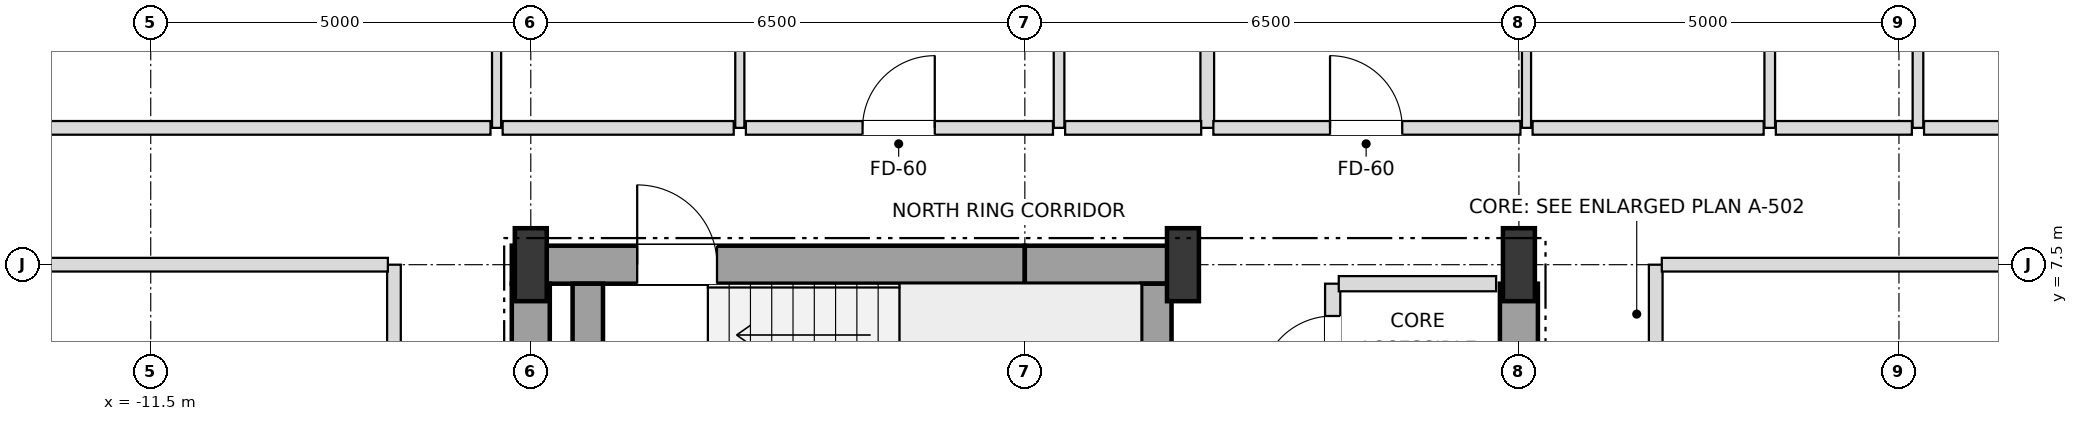
"""IFC4 building model, lengths in metres.
Left out: names, types, materials, properties, quantities, classifications, styles, units other than length and angle.
Written with IfcOpenShell. Run it as: python <this file> out.ifc"""

import sys

from ifc_helpers import new_model, si_unit, direction, frame, frame_2d, origin, origin_2d, place, context, subcontext, project, spatial, rectangle, i_section, extrude, element, fill, save


model = new_model("IFC4")
c1 = context("Model", 3, precision=1e-05, world=origin(), true_north=direction((0.0, 1.0)))
c2 = subcontext(c1, "Body", "Model", "MODEL_VIEW")
j1 = project(units=[si_unit("LENGTHUNIT", "METRE"), si_unit("PLANEANGLEUNIT", "RADIAN")], contexts=[c1])
p1 = place(None, origin())
s1 = spatial("IfcSite", under=j1, at=p1, CompositionType="ELEMENT")
p2 = place(p1, origin())
s2 = spatial("IfcBuilding", under=s1, at=p2, CompositionType="ELEMENT")
p3 = place(p2, frame((0.0, 0.0, 57.6)))
s3 = spatial("IfcBuildingStorey", under=s2, at=p3, CompositionType="ELEMENT", Elevation=57.6)
for number, where, z_axis, x_axis in (
    (1, (-6.5, 7.5, 0.0), (0.0, 0.0, 1.0), (1.0, 0.0, 0.0)),
    (2, (2.08, 7.5, 0.0), (0.0, 0.0, 1.0), (1.0, 0.0, 0.0)),
    (3, (6.5, 7.5, 0.0), (0.0, 0.0, 1.0), (1.0, 0.0, 0.0)),
):
    element("IfcColumn", number, at=place(p3, frame(where, z_axis=z_axis, x_axis=x_axis)), inside=s3, PredefinedType="COLUMN", context=c2, shape_type="SweptSolid", body=[
        extrude(i_section(OverallWidth=0.42, OverallDepth=0.96, WebThickness=0.022, FlangeThickness=0.034, at=origin_2d()), origin(), (0.0, 0.0, 1.0), 3.6),
    ])
p4 = place(p3, frame((-6.75, 7.5, 0.0), z_axis=(0.0, 0.0, 1.0), x_axis=(1.0, 0.0, 0.0)))
e4 = element("IfcWall", 4, at=p4, inside=s3, PredefinedType="SHEAR", context=c2, shape_type="SweptSolid", body=[
    extrude(rectangle(XDim=6.75, YDim=0.5, at=frame_2d((3.375, 0.0))), origin(), (0.0, 0.0, 1.0), 3.38),
])
p5 = place(p4, frame((1.65, 0.0, 0.0)))
e5 = element("IfcOpeningElement", 5, at=p5, cuts=e4, PredefinedType="OPENING", context=c2, shape_type="SweptSolid", body=[
    extrude(rectangle(XDim=1.05, YDim=2.15, at=frame_2d((0.525, 1.075))), frame((0.0, 0.26, 0.0), z_axis=(0.0, -1.0, 0.0), x_axis=(1.0, 0.0, 0.0)), (0.0, 0.0, 1.0), 0.52),
])
p6 = place(p3, frame((0.0, 7.5, 0.0), z_axis=(0.0, 0.0, 1.0), x_axis=(1.0, 0.0, 0.0)))
e6 = element("IfcWall", 6, at=p6, inside=s3, PredefinedType="SHEAR", context=c2, shape_type="SweptSolid", body=[
    extrude(rectangle(XDim=2.08, YDim=0.5, at=frame_2d((1.04, 0.0))), origin(), (0.0, 0.0, 1.0), 3.38),
])
for number, where, z_axis, x_axis in (
    (7, (-6.5, 3.95, 0.0), (0.0, 0.0, 1.0), (0.0, 1.0, 0.0)),
    (8, (6.5, 3.95, 0.0), (0.0, 0.0, 1.0), (0.0, 1.0, 0.0)),
):
    element("IfcWall", number, at=place(p3, frame(where, z_axis=z_axis, x_axis=x_axis)), inside=s3, PredefinedType="SHEAR", context=c2, shape_type="SweptSolid", body=[
        extrude(rectangle(XDim=3.3, YDim=0.5, at=frame_2d((1.65, 0.0))), origin(), (0.0, 0.0, 1.0), 3.38),
    ])
for number, where, z_axis, x_axis in (
    (9, (1.73, 3.95, 0.0), (0.0, 0.0, 1.0), (0.0, 1.0, 0.0)),
    (10, (-5.75, 3.95, 0.0), (0.0, 0.0, 1.0), (0.0, 1.0, 0.0)),
):
    element("IfcWall", number, at=place(p3, frame(where, z_axis=z_axis, x_axis=x_axis)), inside=s3, PredefinedType="SHEAR", context=c2, shape_type="SweptSolid", body=[
        extrude(rectangle(XDim=3.3, YDim=0.4, at=frame_2d((1.65, 0.0))), origin(), (0.0, 0.0, 1.0), 3.38),
    ])
p7 = place(p3, frame((-8.3, -7.5, 0.0), z_axis=(0.0, 0.0, 1.0), x_axis=(0.0, 1.0, 0.0)))
e11 = element("IfcWall", 11, at=p7, inside=s3, PredefinedType="PARTITIONING", context=c2, shape_type="SweptSolid", body=[
    extrude(rectangle(XDim=15.0, YDim=0.18, at=frame_2d((7.5, 0.0))), origin(), (0.0, 0.0, 1.0), 3.38),
])
p8 = place(p7, frame((3.475, 0.0, 0.0)))
e12 = element("IfcOpeningElement", 12, at=p8, cuts=e11, PredefinedType="OPENING", context=c2, shape_type="SweptSolid", body=[
    extrude(rectangle(XDim=0.95, YDim=2.15, at=frame_2d((0.475, 1.075))), frame((0.0, 0.1, 0.0), z_axis=(0.0, -1.0, 0.0), x_axis=(1.0, 0.0, 0.0)), (0.0, 0.0, 1.0), 0.2),
])
p9 = place(p3, frame((-6.95, 9.3, 0.0), z_axis=(0.0, 0.0, 1.0), x_axis=(0.0, 1.0, 0.0)))
e13 = element("IfcWall", 13, at=p9, inside=s3, PredefinedType="PARTITIONING", context=c2, shape_type="SweptSolid", body=[
    extrude(rectangle(XDim=9.6, YDim=0.12, at=frame_2d((4.8, 0.0))), origin(), (0.0, 0.0, 1.0), 2.816),
])
p10 = place(p9, frame((4.35, 0.0, 0.0)))
e14 = element("IfcOpeningElement", 14, at=p10, cuts=e13, PredefinedType="OPENING", context=c2, shape_type="SweptSolid", body=[
    extrude(rectangle(XDim=0.9, YDim=2.1, at=frame_2d((0.45, 1.05))), frame((0.0, 0.07, 0.0), z_axis=(0.0, -1.0, 0.0), x_axis=(1.0, 0.0, 0.0)), (0.0, 0.0, 1.0), 0.14),
])
p11 = place(p3, frame((-3.75, 9.3, 0.0), z_axis=(0.0, 0.0, 1.0), x_axis=(0.0, 1.0, 0.0)))
e15 = element("IfcWall", 15, at=p11, inside=s3, PredefinedType="PARTITIONING", context=c2, shape_type="SweptSolid", body=[
    extrude(rectangle(XDim=15.6, YDim=0.12, at=frame_2d((7.8, 0.0))), origin(), (0.0, 0.0, 1.0), 2.816),
])
p12 = place(p11, frame((4.325, 0.0, 0.0)))
e16 = element("IfcOpeningElement", 16, at=p12, cuts=e15, PredefinedType="OPENING", context=c2, shape_type="SweptSolid", body=[
    extrude(rectangle(XDim=0.95, YDim=2.1, at=frame_2d((0.475, 1.05))), frame((0.0, 0.07, 0.0), z_axis=(0.0, -1.0, 0.0), x_axis=(1.0, 0.0, 0.0)), (0.0, 0.0, 1.0), 0.14),
])
p13 = place(p11, frame((12.15, 0.0, 0.0)))
e17 = element("IfcOpeningElement", 17, at=p13, cuts=e15, PredefinedType="OPENING", context=c2, shape_type="SweptSolid", body=[
    extrude(rectangle(XDim=0.9, YDim=2.1, at=frame_2d((0.45, 1.05))), frame((0.0, 0.07, 0.0), z_axis=(0.0, -1.0, 0.0), x_axis=(1.0, 0.0, 0.0)), (0.0, 0.0, 1.0), 0.14),
])
p14 = place(p3, frame((0.45, 9.3, 0.0), z_axis=(0.0, 0.0, 1.0), x_axis=(0.0, 1.0, 0.0)))
e18 = element("IfcWall", 18, at=p14, inside=s3, PredefinedType="PARTITIONING", context=c2, shape_type="SweptSolid", body=[
    extrude(rectangle(XDim=9.6, YDim=0.14, at=frame_2d((4.8, 0.0))), origin(), (0.0, 0.0, 1.0), 2.948),
])
p15 = place(p14, frame((4.35, 0.0, 0.0)))
e19 = element("IfcOpeningElement", 19, at=p15, cuts=e18, PredefinedType="OPENING", context=c2, shape_type="SweptSolid", body=[
    extrude(rectangle(XDim=0.9, YDim=2.1, at=frame_2d((0.45, 1.05))), frame((0.0, 0.08, 0.0), z_axis=(0.0, -1.0, 0.0), x_axis=(1.0, 0.0, 0.0)), (0.0, 0.0, 1.0), 0.16),
])
p16 = place(p3, frame((2.4, 9.3, 0.0), z_axis=(0.0, 0.0, 1.0), x_axis=(0.0, 1.0, 0.0)))
e20 = element("IfcWall", 20, at=p16, inside=s3, PredefinedType="PARTITIONING", context=c2, shape_type="SweptSolid", body=[
    extrude(rectangle(XDim=15.6, YDim=0.18, at=frame_2d((7.8, 0.0))), origin(), (0.0, 0.0, 1.0), 2.816),
])
p17 = place(p3, frame((4.05, 5.55, 0.0), z_axis=(0.0, 0.0, 1.0), x_axis=(0.0, 1.0, 0.0)))
e21 = element("IfcWall", 21, at=p17, inside=s3, PredefinedType="SOLIDWALL", context=c2, shape_type="SweptSolid", body=[
    extrude(rectangle(XDim=1.7, YDim=0.2, at=frame_2d((0.85, 0.0))), origin(), (0.0, 0.0, 1.0), 3.38),
])
p18 = place(p17, frame((0.325, 0.0, 0.0)))
e22 = element("IfcOpeningElement", 22, at=p18, cuts=e21, PredefinedType="OPENING", context=c2, shape_type="SweptSolid", body=[
    extrude(rectangle(XDim=0.95, YDim=2.15, at=frame_2d((0.475, 1.075))), frame((0.0, 0.11, 0.0), z_axis=(0.0, -1.0, 0.0), x_axis=(1.0, 0.0, 0.0)), (0.0, 0.0, 1.0), 0.22),
])
p19 = place(p3, frame((6.6, 9.3, 0.0), z_axis=(0.0, 0.0, 1.0), x_axis=(0.0, 1.0, 0.0)))
e23 = element("IfcWall", 23, at=p19, inside=s3, PredefinedType="PARTITIONING", context=c2, shape_type="SweptSolid", body=[
    extrude(rectangle(XDim=9.6, YDim=0.12, at=frame_2d((4.8, 0.0))), origin(), (0.0, 0.0, 1.0), 2.816),
])
p20 = place(p19, frame((4.325, 0.0, 0.0)))
e24 = element("IfcOpeningElement", 24, at=p20, cuts=e23, PredefinedType="OPENING", context=c2, shape_type="SweptSolid", body=[
    extrude(rectangle(XDim=0.95, YDim=2.1, at=frame_2d((0.475, 1.05))), frame((0.0, 0.07, 0.0), z_axis=(0.0, -1.0, 0.0), x_axis=(1.0, 0.0, 0.0)), (0.0, 0.0, 1.0), 0.14),
])
p21 = place(p3, frame((8.3, -7.5, 0.0), z_axis=(0.0, 0.0, 1.0), x_axis=(0.0, 1.0, 0.0)))
e25 = element("IfcWall", 25, at=p21, inside=s3, PredefinedType="PARTITIONING", context=c2, shape_type="SweptSolid", body=[
    extrude(rectangle(XDim=15.0, YDim=0.18, at=frame_2d((7.5, 0.0))), origin(), (0.0, 0.0, 1.0), 3.38),
])
p22 = place(p21, frame((3.475, 0.0, 0.0)))
e26 = element("IfcOpeningElement", 26, at=p22, cuts=e25, PredefinedType="OPENING", context=c2, shape_type="SweptSolid", body=[
    extrude(rectangle(XDim=0.95, YDim=2.15, at=frame_2d((0.475, 1.075))), frame((0.0, 0.1, 0.0), z_axis=(0.0, -1.0, 0.0), x_axis=(1.0, 0.0, 0.0)), (0.0, 0.0, 1.0), 0.2),
])
p23 = place(p3, frame((9.8, 9.3, 0.0), z_axis=(0.0, 0.0, 1.0), x_axis=(0.0, 1.0, 0.0)))
e27 = element("IfcWall", 27, at=p23, inside=s3, PredefinedType="PARTITIONING", context=c2, shape_type="SweptSolid", body=[
    extrude(rectangle(XDim=9.6, YDim=0.14, at=frame_2d((4.8, 0.0))), origin(), (0.0, 0.0, 1.0), 2.816),
])
p24 = place(p23, frame((4.35, 0.0, 0.0)))
e28 = element("IfcOpeningElement", 28, at=p24, cuts=e27, PredefinedType="OPENING", context=c2, shape_type="SweptSolid", body=[
    extrude(rectangle(XDim=0.9, YDim=2.1, at=frame_2d((0.45, 1.05))), frame((0.0, 0.08, 0.0), z_axis=(0.0, -1.0, 0.0), x_axis=(1.0, 0.0, 0.0)), (0.0, 0.0, 1.0), 0.16),
])
p25 = place(p3, frame((11.75, 9.3, 0.0), z_axis=(0.0, 0.0, 1.0), x_axis=(0.0, 1.0, 0.0)))
e29 = element("IfcWall", 29, at=p25, inside=s3, PredefinedType="PARTITIONING", context=c2, shape_type="SweptSolid", body=[
    extrude(rectangle(XDim=15.6, YDim=0.14, at=frame_2d((7.8, 0.0))), origin(), (0.0, 0.0, 1.0), 2.736),
])
p26 = place(p25, frame((12.15, 0.0, 0.0)))
e30 = element("IfcOpeningElement", 30, at=p26, cuts=e29, PredefinedType="OPENING", context=c2, shape_type="SweptSolid", body=[
    extrude(rectangle(XDim=0.9, YDim=2.1, at=frame_2d((0.45, 1.05))), frame((0.0, 0.08, 0.0), z_axis=(0.0, -1.0, 0.0), x_axis=(1.0, 0.0, 0.0)), (0.0, 0.0, 1.0), 0.16),
])
p27 = place(p3, frame((4.13, 7.25, 0.0), z_axis=(0.0, 0.0, 1.0), x_axis=(1.0, 0.0, 0.0)))
e31 = element("IfcWall", 31, at=p27, inside=s3, PredefinedType="SOLIDWALL", context=c2, shape_type="SweptSolid", body=[
    extrude(rectangle(XDim=2.07, YDim=0.2, at=frame_2d((1.035, 0.0))), origin(), (0.0, 0.0, 1.0), 3.38),
])
for number, where, z_axis, x_axis in (
    (32, (-16.02, 7.5, 0.0), (0.0, 0.0, 1.0), (1.0, 0.0, 0.0)),
    (33, (8.38, 7.5, 0.0), (0.0, 0.0, 1.0), (1.0, 0.0, 0.0)),
):
    element("IfcWall", number, at=place(p3, frame(where, z_axis=z_axis, x_axis=x_axis)), inside=s3, PredefinedType="PARTITIONING", context=c2, shape_type="SweptSolid", body=[
        extrude(rectangle(XDim=7.64, YDim=0.18, at=frame_2d((3.82, 0.0))), origin(), (0.0, 0.0, 1.0), 2.816),
    ])
p28 = place(p3, frame((-18.32, 9.3, 0.0), z_axis=(0.0, 0.0, 1.0), x_axis=(1.0, 0.0, 0.0)))
e34 = element("IfcWall", 34, at=p28, inside=s3, PredefinedType="PARTITIONING", context=c2, shape_type="SweptSolid", body=[
    extrude(rectangle(XDim=11.29, YDim=0.18, at=frame_2d((5.645, 0.0))), origin(), (0.0, 0.0, 1.0), 2.816),
])
p29 = place(p3, frame((-6.87, 9.3, 0.0), z_axis=(0.0, 0.0, 1.0), x_axis=(1.0, 0.0, 0.0)))
e35 = element("IfcWall", 35, at=p29, inside=s3, PredefinedType="PARTITIONING", context=c2, shape_type="SweptSolid", body=[
    extrude(rectangle(XDim=3.04, YDim=0.18, at=frame_2d((1.52, 0.0))), origin(), (0.0, 0.0, 1.0), 2.816),
])
p30 = place(p3, frame((-3.67, 9.3, 0.0), z_axis=(0.0, 0.0, 1.0), x_axis=(1.0, 0.0, 0.0)))
e36 = element("IfcWall", 36, at=p30, inside=s3, PredefinedType="PARTITIONING", context=c2, shape_type="SweptSolid", body=[
    extrude(rectangle(XDim=4.04, YDim=0.18, at=frame_2d((2.02, 0.0))), origin(), (0.0, 0.0, 1.0), 3.38),
])
p31 = place(p30, frame((1.535, 0.0, 0.0)))
e37 = element("IfcOpeningElement", 37, at=p31, cuts=e36, PredefinedType="OPENING", context=c2, shape_type="SweptSolid", body=[
    extrude(rectangle(XDim=0.95, YDim=2.15, at=frame_2d((0.475, 1.075))), frame((0.0, 0.1, 0.0), z_axis=(0.0, -1.0, 0.0), x_axis=(1.0, 0.0, 0.0)), (0.0, 0.0, 1.0), 0.2),
])
p32 = place(p3, frame((0.53, 9.3, 0.0), z_axis=(0.0, 0.0, 1.0), x_axis=(1.0, 0.0, 0.0)))
e38 = element("IfcWall", 38, at=p32, inside=s3, PredefinedType="PARTITIONING", context=c2, shape_type="SweptSolid", body=[
    extrude(rectangle(XDim=1.79, YDim=0.18, at=frame_2d((0.895, 0.0))), origin(), (0.0, 0.0, 1.0), 3.38),
])
p33 = place(p3, frame((2.48, 9.3, 0.0), z_axis=(0.0, 0.0, 1.0), x_axis=(1.0, 0.0, 0.0)))
e39 = element("IfcWall", 39, at=p33, inside=s3, PredefinedType="PARTITIONING", context=c2, shape_type="SweptSolid", body=[
    extrude(rectangle(XDim=4.04, YDim=0.18, at=frame_2d((2.02, 0.0))), origin(), (0.0, 0.0, 1.0), 3.38),
])
p34 = place(p33, frame((1.535, 0.0, 0.0)))
e40 = element("IfcOpeningElement", 40, at=p34, cuts=e39, PredefinedType="OPENING", context=c2, shape_type="SweptSolid", body=[
    extrude(rectangle(XDim=0.95, YDim=2.15, at=frame_2d((0.475, 1.075))), frame((0.0, 0.1, 0.0), z_axis=(0.0, -1.0, 0.0), x_axis=(1.0, 0.0, 0.0)), (0.0, 0.0, 1.0), 0.2),
])
p35 = place(p3, frame((6.68, 9.3, 0.0), z_axis=(0.0, 0.0, 1.0), x_axis=(1.0, 0.0, 0.0)))
e41 = element("IfcWall", 41, at=p35, inside=s3, PredefinedType="PARTITIONING", context=c2, shape_type="SweptSolid", body=[
    extrude(rectangle(XDim=3.04, YDim=0.18, at=frame_2d((1.52, 0.0))), origin(), (0.0, 0.0, 1.0), 3.38),
])
p36 = place(p3, frame((9.88, 9.3, 0.0), z_axis=(0.0, 0.0, 1.0), x_axis=(1.0, 0.0, 0.0)))
e42 = element("IfcWall", 42, at=p36, inside=s3, PredefinedType="PARTITIONING", context=c2, shape_type="SweptSolid", body=[
    extrude(rectangle(XDim=1.79, YDim=0.18, at=frame_2d((0.895, 0.0))), origin(), (0.0, 0.0, 1.0), 3.38),
])
p37 = place(p3, frame((11.83, 9.3, 0.0), z_axis=(0.0, 0.0, 1.0), x_axis=(1.0, 0.0, 0.0)))
e43 = element("IfcWall", 43, at=p37, inside=s3, PredefinedType="PARTITIONING", context=c2, shape_type="SweptSolid", body=[
    extrude(rectangle(XDim=6.49, YDim=0.18, at=frame_2d((3.245, 0.0))), origin(), (0.0, 0.0, 1.0), 2.816),
])
p38 = place(p5, origin())
e44 = element("IfcDoor", 44, at=p38, inside=s3, OperationType="SINGLE_SWING_LEFT", PredefinedType="DOOR", context=c2, shape_type="SweptSolid", body=[
    extrude(rectangle(XDim=1.05, YDim=2.15, at=frame_2d((0.525, 1.075))), frame((0.0, 0.025, 0.0), z_axis=(0.0, -1.0, 0.0), x_axis=(1.0, 0.0, 0.0)), (0.0, 0.0, 1.0), 0.05),
])
fill(e5, e44)
p39 = place(p18, origin())
e45 = element("IfcDoor", 45, at=p39, inside=s3, OperationType="SINGLE_SWING_LEFT", PredefinedType="DOOR", context=c2, shape_type="SweptSolid", body=[
    extrude(rectangle(XDim=0.95, YDim=2.15, at=frame_2d((0.475, 1.075))), frame((0.0, 0.025, 0.0), z_axis=(0.0, -1.0, 0.0), x_axis=(1.0, 0.0, 0.0)), (0.0, 0.0, 1.0), 0.05),
])
fill(e22, e45)
p40 = place(p31, origin())
e46 = element("IfcDoor", 46, at=p40, inside=s3, OperationType="SINGLE_SWING_RIGHT", PredefinedType="DOOR", context=c2, shape_type="SweptSolid", body=[
    extrude(rectangle(XDim=0.95, YDim=2.15, at=frame_2d((0.475, 1.075))), frame((0.0, 0.025, 0.0), z_axis=(0.0, -1.0, 0.0), x_axis=(1.0, 0.0, 0.0)), (0.0, 0.0, 1.0), 0.05),
])
fill(e37, e46)
p41 = place(p34, origin())
e47 = element("IfcDoor", 47, at=p41, inside=s3, OperationType="SINGLE_SWING_LEFT", PredefinedType="DOOR", context=c2, shape_type="SweptSolid", body=[
    extrude(rectangle(XDim=0.95, YDim=2.15, at=frame_2d((0.475, 1.075))), frame((0.0, 0.025, 0.0), z_axis=(0.0, -1.0, 0.0), x_axis=(1.0, 0.0, 0.0)), (0.0, 0.0, 1.0), 0.05),
])
fill(e40, e47)
save(model, sys.argv[1])
